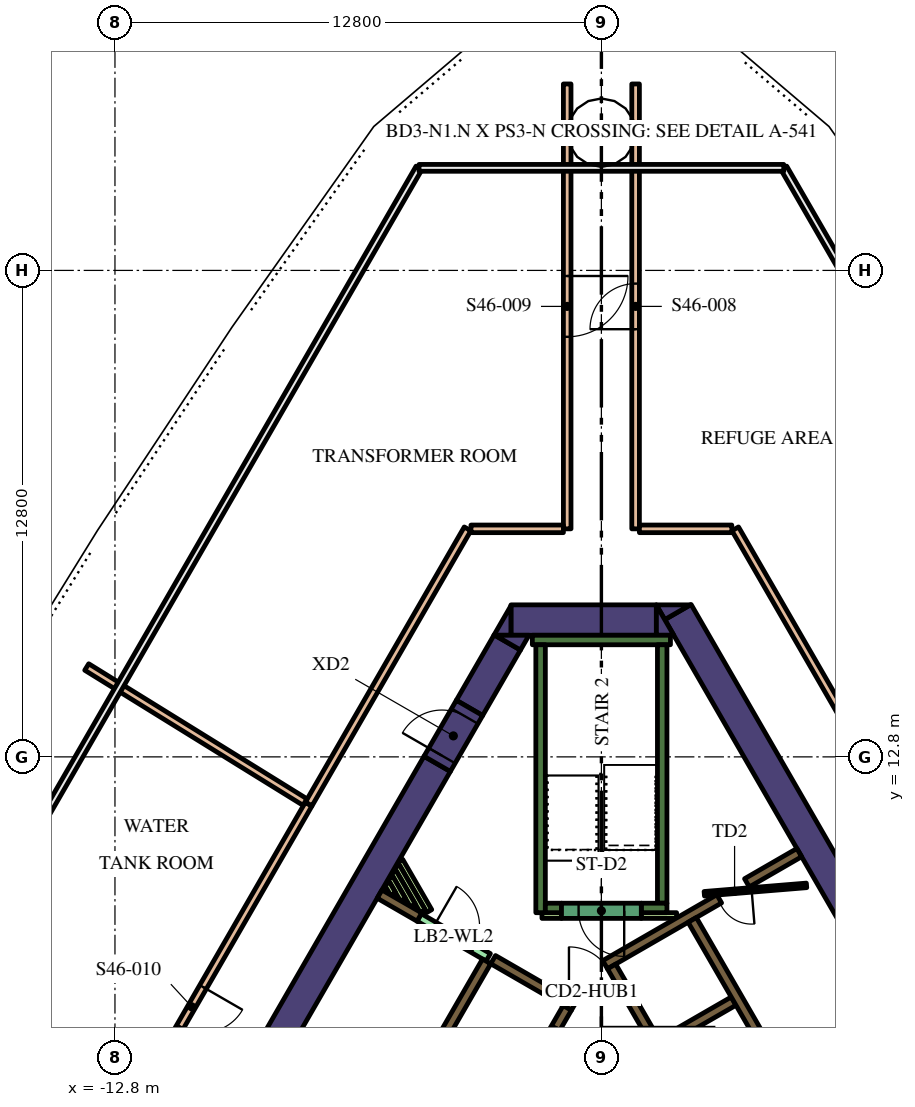
"""IFC4 building model, lengths in metres.
Left out: names, types, materials, properties, quantities, classifications, styles, units other than length and angle.
Written with IfcOpenShell. Run it as: python <this file> out.ifc"""

import sys

from ifc_helpers import new_model, si_unit, direction, frame, frame_2d, origin, place, context, subcontext, project, spatial, polyline, rectangle, outline, extrude, element, fill, save


model = new_model("IFC4")
c1 = context("Model", 3, precision=1e-05, world=origin(), true_north=direction((0.0, 1.0)))
c2 = subcontext(c1, "Body", "Model", "MODEL_VIEW")
j1 = project(units=[si_unit("LENGTHUNIT", "METRE"), si_unit("PLANEANGLEUNIT", "RADIAN")], contexts=[c1])
p1 = place(None, origin())
s1 = spatial("IfcSite", under=j1, at=p1, CompositionType="ELEMENT")
p2 = place(p1, origin())
s2 = spatial("IfcBuilding", under=s1, at=p2, CompositionType="ELEMENT")
p3 = place(p2, frame((0.0, 0.0, 196.2)))
s3 = spatial("IfcBuildingStorey", under=s2, at=p3, CompositionType="ELEMENT", Elevation=196.2)
p4 = place(p3, frame((8.279, 5.761, 0.0), z_axis=(0.0, 0.0, 1.0), x_axis=(-0.500010359015, 0.866019422922, 0.0)))
e1 = element("IfcWall", 1, at=p4, inside=s3, PredefinedType="SOLIDWALL", context=c2, shape_type="SweptSolid", body=[
    extrude(rectangle(XDim=12.528, YDim=0.8, at=frame_2d((6.264, 0.0))), origin(), (0.0, 0.0, 1.0), 5.4),
])
p5 = place(p3, origin())
e2 = element("IfcWall", 2, at=p5, inside=s3, PredefinedType="SOLIDWALL", context=c2, shape_type="SweptSolid", body=[
    extrude(outline(polyline([(1.443, 16.8), (2.339, 16.8), (1.667, 16.412), (1.443, 16.8)])), origin(), (0.0, 0.0, 1.0), 5.4),
])
p6 = place(p3, frame((-2.379, 16.4, 0.0), z_axis=(0.0, 0.0, 1.0), x_axis=(1.0, 0.0, 0.0)))
e3 = element("IfcWall", 3, at=p6, inside=s3, PredefinedType="SOLIDWALL", context=c2, shape_type="SweptSolid", body=[
    extrude(rectangle(XDim=3.824, YDim=0.8, at=frame_2d((1.912, 0.0))), origin(), (0.0, 0.0, 1.0), 5.4),
])
e4 = element("IfcWall", 4, at=p5, inside=s3, PredefinedType="SOLIDWALL", context=c2, shape_type="SweptSolid", body=[
    extrude(outline(polyline([(1.905, 16.0), (1.447, 16.0), (1.447, 16.793), (1.905, 16.0)])), origin(), (0.0, 0.0, 1.0), 5.4),
])
e5 = element("IfcWall", 5, at=p5, inside=s3, PredefinedType="SOLIDWALL", context=c2, shape_type="SweptSolid", body=[
    extrude(outline(polyline([(-2.829, 16.0), (-2.381, 16.776), (-2.381, 16.0), (-2.829, 16.0)])), origin(), (0.0, 0.0, 1.0), 5.4),
])
p7 = place(p3, frame((-2.477, 15.81, 0.0), z_axis=(0.0, 0.0, 1.0), x_axis=(-0.499903161488, -0.866081306307, 0.0)))
e6 = element("IfcWall", 6, at=p7, inside=s3, PredefinedType="SOLIDWALL", context=c2, shape_type="SweptSolid", body=[
    extrude(rectangle(XDim=1.988, YDim=0.8, at=frame_2d((0.994, 0.0))), origin(), (0.0, 0.0, 1.0), 5.4),
])
e7 = element("IfcWall", 7, at=p5, inside=s3, PredefinedType="SOLIDWALL", context=c2, shape_type="SweptSolid", body=[
    extrude(outline(polyline([(-1.905, 16.0), (-2.129, 15.612), (-2.801, 16.0), (-1.905, 16.0)])), origin(), (0.0, 0.0, 1.0), 5.4),
])
p8 = place(p3, frame((-4.321, 12.616, 0.0), z_axis=(0.0, 0.0, 1.0), x_axis=(-0.500009809857, -0.866019739987, 0.0)))
e8 = element("IfcWall", 8, at=p8, inside=s3, PredefinedType="SOLIDWALL", context=c2, shape_type="SweptSolid", body=[
    extrude(rectangle(XDim=16.695, YDim=0.8, at=frame_2d((8.347, 0.0))), origin(), (0.0, 0.0, 1.0), 5.4),
])
p9 = place(p3, frame((-1.817, 15.875, 0.0), z_axis=(0.0, 0.0, 1.0), x_axis=(1.0, 0.0, 0.0)))
e9 = element("IfcWall", 9, at=p9, inside=s3, PredefinedType="SOLIDWALL", context=c2, shape_type="SweptSolid", body=[
    extrude(rectangle(XDim=3.634, YDim=0.25, at=frame_2d((1.817, 0.0))), origin(), (0.0, 0.0, 1.0), 5.4),
])
p10 = place(p3, frame((1.6, 8.95, 0.0), z_axis=(0.0, 0.0, 1.0), x_axis=(0.0, 1.0, 0.0)))
e10 = element("IfcWall", 10, at=p10, inside=s3, PredefinedType="SOLIDWALL", context=c2, shape_type="SweptSolid", body=[
    extrude(rectangle(XDim=6.8, YDim=0.25, at=frame_2d((3.4, 0.0))), origin(), (0.0, 0.0, 1.0), 5.4),
])
p11 = place(p3, frame((1.05, 8.825, 0.0), z_axis=(0.0, 0.0, 1.0), x_axis=(1.0, 0.0, 0.0)))
e11 = element("IfcWall", 11, at=p11, inside=s3, PredefinedType="SOLIDWALL", context=c2, shape_type="SweptSolid", body=[
    extrude(rectangle(XDim=0.675, YDim=0.25, at=frame_2d((0.337, 0.0))), origin(), (0.0, 0.0, 1.0), 5.4),
])
p12 = place(p3, frame((-1.6, 8.7, 0.0), z_axis=(0.0, 0.0, 1.0), x_axis=(0.0, 1.0, 0.0)))
e12 = element("IfcWall", 12, at=p12, inside=s3, PredefinedType="SOLIDWALL", context=c2, shape_type="SweptSolid", body=[
    extrude(rectangle(XDim=7.05, YDim=0.25, at=frame_2d((3.525, 0.0))), origin(), (0.0, 0.0, 1.0), 5.4),
])
p13 = place(p3, frame((-1.475, 8.825, 0.0), z_axis=(0.0, 0.0, 1.0), x_axis=(1.0, 0.0, 0.0)))
e13 = element("IfcWall", 13, at=p13, inside=s3, PredefinedType="SOLIDWALL", context=c2, shape_type="SweptSolid", body=[
    extrude(rectangle(XDim=0.425, YDim=0.25, at=frame_2d((0.212, 0.0))), origin(), (0.0, 0.0, 1.0), 5.4),
])
p14 = place(p3, frame((3.1, 9.064, 0.0), z_axis=(0.0, 0.0, 1.0), x_axis=(-0.866033137035, -0.499986605379, 0.0)))
e14 = element("IfcWall", 14, at=p14, inside=s3, PredefinedType="SOLIDWALL", context=c2, shape_type="SweptSolid", body=[
    extrude(rectangle(XDim=3.467, YDim=0.25, at=frame_2d((1.733, 0.0))), origin(), (0.0, 0.0, 1.0), 5.4),
])
p15 = place(p3, frame((0.268, 7.285, 0.0), z_axis=(0.0, 0.0, 1.0), x_axis=(0.500098681536, -0.865968422476, 0.0)))
e15 = element("IfcWall", 15, at=p15, inside=s3, PredefinedType="SOLIDWALL", context=c2, shape_type="SweptSolid", body=[
    extrude(rectangle(XDim=0.636, YDim=0.25, at=frame_2d((0.318, 0.0))), origin(), (0.0, 0.0, 1.0), 5.4),
])
p16 = place(p3, frame((5.97, -2.591, 0.0), z_axis=(0.0, 0.0, 1.0), x_axis=(-0.499994469932, 0.866028596547, 0.0)))
e16 = element("IfcWall", 16, at=p16, inside=s3, PredefinedType="SOLIDWALL", context=c2, shape_type="SweptSolid", body=[
    extrude(rectangle(XDim=10.488, YDim=0.25, at=frame_2d((5.244, 0.0))), origin(), (0.0, 0.0, 1.0), 5.4),
])
p17 = place(p3, frame((1.574, 5.274, 0.0), z_axis=(0.0, 0.0, 1.0), x_axis=(0.866028486751, 0.499994660107, 0.0)))
e17 = element("IfcWall", 17, at=p17, inside=s3, PredefinedType="SOLIDWALL", context=c2, shape_type="SweptSolid", body=[
    extrude(rectangle(XDim=2.2, YDim=0.25, at=frame_2d((1.1, 0.0))), origin(), (0.0, 0.0, 1.0), 5.4),
])
p18 = place(p3, frame((3.83, 9.486, 0.0), z_axis=(0.0, 0.0, 1.0), x_axis=(0.865986202621, 0.500067892261, 0.0)))
e18 = element("IfcWall", 18, at=p18, inside=s3, PredefinedType="SOLIDWALL", context=c2, shape_type="SweptSolid", body=[
    extrude(rectangle(XDim=1.591, YDim=0.25, at=frame_2d((0.795, 0.0))), origin(), (0.0, 0.0, 1.0), 5.4),
])
p19 = place(p3, frame((-3.02, 7.419, 0.0), z_axis=(0.0, 0.0, 1.0), x_axis=(-0.500022956343, -0.866012149528, 0.0)))
e19 = element("IfcWall", 19, at=p19, inside=s3, PredefinedType="SOLIDWALL", context=c2, shape_type="SweptSolid", body=[
    extrude(rectangle(XDim=10.08, YDim=0.25, at=frame_2d((5.04, 0.0))), origin(), (0.0, 0.0, 1.0), 5.4),
])
e20 = element("IfcWall", 20, at=p5, inside=s3, PredefinedType="SOLIDWALL", context=c2, shape_type="SweptSolid", body=[
    extrude(outline(polyline([(-2.912, 7.356), (-2.787, 7.573), (-1.232, 6.675), (-1.303, 6.675), (-1.304, 6.675), (-1.304, 6.675), (-1.304, 6.525), (-1.304, 6.525), (-1.303, 6.525), (-0.971, 6.525), (-0.665, 6.348), (-0.79, 6.132), (-1.007, 6.257), (-1.007, 6.257), (-2.912, 7.356)])), origin(), (0.0, 0.0, 1.0), 5.4),
])
p20 = place(p3, frame((-5.837, 9.19, 0.0), z_axis=(0.0, 0.0, 1.0), x_axis=(0.866024298998, -0.500001913541, 0.0)))
e21 = element("IfcWall", 21, at=p20, inside=s3, PredefinedType="SOLIDWALL", context=c2, shape_type="SweptSolid", body=[
    extrude(rectangle(XDim=1.21, YDim=0.25, at=frame_2d((0.605, 0.0))), origin(), (0.0, 0.0, 1.0), 5.4),
])
p21 = place(p3, frame((-5.294, 10.067, 0.0), z_axis=(0.0, 0.0, 1.0), x_axis=(0.500054140411, -0.865994143547, 0.0)))
e22 = element("IfcWall", 22, at=p21, inside=s3, PredefinedType="PARTITIONING", context=c2, shape_type="SweptSolid", body=[
    extrude(rectangle(XDim=1.529, YDim=0.15, at=frame_2d((0.765, 0.0))), origin(), (0.0, 0.0, 1.0), 4.65),
])
p22 = place(p3, frame((-5.381, 9.917, 0.0), z_axis=(0.0, 0.0, 1.0), x_axis=(0.500136970483, -0.865946309396, 0.0)))
e23 = element("IfcWall", 23, at=p22, inside=s3, PredefinedType="PARTITIONING", context=c2, shape_type="SweptSolid", body=[
    extrude(rectangle(XDim=1.359, YDim=0.15, at=frame_2d((0.68, 0.0))), origin(), (0.0, 0.0, 1.0), 4.65),
])
p23 = place(p3, frame((-5.467, 9.767, 0.0), z_axis=(0.0, 0.0, 1.0), x_axis=(0.500168849293, -0.86592789665, 0.0)))
e24 = element("IfcWall", 24, at=p23, inside=s3, PredefinedType="PARTITIONING", context=c2, shape_type="SweptSolid", body=[
    extrude(rectangle(XDim=1.01, YDim=0.15, at=frame_2d((0.505, 0.0))), origin(), (0.0, 0.0, 1.0), 4.65),
])
p24 = place(p3, frame((-5.554, 9.617, 0.0), z_axis=(0.0, 0.0, 1.0), x_axis=(0.500253084543, -0.86587923604, 0.0)))
e25 = element("IfcWall", 25, at=p24, inside=s3, PredefinedType="PARTITIONING", context=c2, shape_type="SweptSolid", body=[
    extrude(rectangle(XDim=0.664, YDim=0.15, at=frame_2d((0.332, 0.0))), origin(), (0.0, 0.0, 1.0), 4.65),
])
p25 = place(p3, frame((-5.64, 9.467, 0.0), z_axis=(0.0, 0.0, 1.0), x_axis=(0.499944387978, -0.86605750902, 0.0)))
e26 = element("IfcWall", 26, at=p25, inside=s3, PredefinedType="PARTITIONING", context=c2, shape_type="SweptSolid", body=[
    extrude(rectangle(XDim=0.317, YDim=0.15, at=frame_2d((0.159, 0.0))), origin(), (0.0, 0.0, 1.0), 4.65),
])
p26 = place(p3, frame((1.05, 8.625, 0.0), z_axis=(0.0, 0.0, 1.0), x_axis=(1.0, 0.0, 0.0)))
e27 = element("IfcWall", 27, at=p26, inside=s3, PredefinedType="PARTITIONING", context=c2, shape_type="SweptSolid", body=[
    extrude(rectangle(XDim=0.929, YDim=0.15, at=frame_2d((0.464, 0.0))), origin(), (0.0, 0.0, 1.0), 4.65),
])
p27 = place(p3, frame((-1.564, 8.625, 0.0), z_axis=(0.0, 0.0, 1.0), x_axis=(1.0, 0.0, 0.0)))
e28 = element("IfcWall", 28, at=p27, inside=s3, PredefinedType="PARTITIONING", context=c2, shape_type="SweptSolid", body=[
    extrude(rectangle(XDim=0.514, YDim=0.15, at=frame_2d((0.257, 0.0))), origin(), (0.0, 0.0, 1.0), 4.65),
])
p28 = place(p3, frame((8.565, -2.185, 0.0), z_axis=(0.0, 0.0, 1.0), x_axis=(-0.499997954832, 0.866026584559, 0.0)))
e29 = element("IfcWall", 29, at=p28, inside=s3, PredefinedType="SOLIDWALL", context=c2, shape_type="SweptSolid", body=[
    extrude(rectangle(XDim=12.35, YDim=0.25, at=frame_2d((6.175, 0.0))), origin(), (0.0, 0.0, 1.0), 5.4),
])
p29 = place(p28, frame((0.585, 0.0, 0.0)))
e30 = element("IfcOpeningElement", 30, at=p29, cuts=e29, PredefinedType="OPENING", context=c2, shape_type="SweptSolid", body=[
    extrude(rectangle(XDim=1.1, YDim=2.1, at=frame_2d((0.55, 1.05))), frame((0.0, 0.135, 0.0), z_axis=(0.0, -1.0, 0.0), x_axis=(1.0, 0.0, 0.0)), (0.0, 0.0, 1.0), 0.27),
])
p30 = place(p3, frame((-0.898, 6.194, 0.0), z_axis=(0.0, 0.0, 1.0), x_axis=(-0.499996202215, -0.866027596426, 0.0)))
e31 = element("IfcWall", 31, at=p30, inside=s3, PredefinedType="SOLIDWALL", context=c2, shape_type="SweptSolid", body=[
    extrude(rectangle(XDim=9.83, YDim=0.25, at=frame_2d((4.915, 0.0))), origin(), (0.0, 0.0, 1.0), 5.4),
])
p31 = place(p30, frame((0.585, 0.0, 0.0)))
e32 = element("IfcOpeningElement", 32, at=p31, cuts=e31, PredefinedType="OPENING", context=c2, shape_type="SweptSolid", body=[
    extrude(rectangle(XDim=1.1, YDim=2.1, at=frame_2d((0.55, 1.05))), frame((0.0, 0.135, 0.0), z_axis=(0.0, -1.0, 0.0), x_axis=(1.0, 0.0, 0.0)), (0.0, 0.0, 1.0), 0.27),
])
p32 = place(p30, frame((3.105, 0.0, 0.0)))
e33 = element("IfcOpeningElement", 33, at=p32, cuts=e31, PredefinedType="OPENING", context=c2, shape_type="SweptSolid", body=[
    extrude(rectangle(XDim=1.1, YDim=2.1, at=frame_2d((0.55, 1.05))), frame((0.0, 0.135, 0.0), z_axis=(0.0, -1.0, 0.0), x_axis=(1.0, 0.0, 0.0)), (0.0, 0.0, 1.0), 0.27),
])
p33 = place(p30, frame((5.625, 0.0, 0.0)))
e34 = element("IfcOpeningElement", 34, at=p33, cuts=e31, PredefinedType="OPENING", context=c2, shape_type="SweptSolid", body=[
    extrude(rectangle(XDim=1.1, YDim=2.1, at=frame_2d((0.55, 1.05))), frame((0.0, 0.135, 0.0), z_axis=(0.0, -1.0, 0.0), x_axis=(1.0, 0.0, 0.0)), (0.0, 0.0, 1.0), 0.27),
])
p34 = place(p30, frame((8.145, 0.0, 0.0)))
e35 = element("IfcOpeningElement", 35, at=p34, cuts=e31, PredefinedType="OPENING", context=c2, shape_type="SweptSolid", body=[
    extrude(rectangle(XDim=1.1, YDim=2.1, at=frame_2d((0.55, 1.05))), frame((0.0, 0.135, 0.0), z_axis=(0.0, -1.0, 0.0), x_axis=(1.0, 0.0, 0.0)), (0.0, 0.0, 1.0), 0.27),
])
p35 = place(p3, frame((1.05, 8.75, 0.0), z_axis=(0.0, 0.0, 1.0), x_axis=(-1.0, 0.0, 0.0)))
e36 = element("IfcWall", 36, at=p35, inside=s3, PredefinedType="SOLIDWALL", context=c2, shape_type="SweptSolid", body=[
    extrude(rectangle(XDim=2.1, YDim=0.4, at=frame_2d((1.05, 0.0))), origin(), (0.0, 0.0, 1.0), 5.4),
])
p36 = place(p35, frame((0.45, 0.0, 0.0)))
e37 = element("IfcOpeningElement", 37, at=p36, cuts=e36, PredefinedType="OPENING", context=c2, shape_type="SweptSolid", body=[
    extrude(rectangle(XDim=1.2, YDim=2.1, at=frame_2d((0.6, 1.05))), frame((0.0, 0.21, 0.0), z_axis=(0.0, -1.0, 0.0), x_axis=(1.0, 0.0, 0.0)), (0.0, 0.0, 1.0), 0.42),
])
p37 = place(p3, frame((5.398, 9.419, 0.0), z_axis=(0.0, 0.0, 1.0), x_axis=(-0.996653416376, -0.081743303248, 0.0)))
e38 = element("IfcWall", 38, at=p37, inside=s3, PredefinedType="PARTITIONING", context=c2, shape_type="SweptSolid", body=[
    extrude(rectangle(XDim=2.7, YDim=0.12, at=frame_2d((1.35, 0.0))), origin(), (0.0, 0.0, 1.0), 4.65),
])
p38 = place(p37, frame((1.45, 0.0, 0.0)))
e39 = element("IfcOpeningElement", 39, at=p38, cuts=e38, PredefinedType="OPENING", context=c2, shape_type="SweptSolid", body=[
    extrude(rectangle(XDim=0.9, YDim=2.1, at=frame_2d((0.45, 1.05))), frame((0.0, 0.07, 0.0), z_axis=(0.0, -1.0, 0.0), x_axis=(1.0, 0.0, 0.0)), (0.0, 0.0, 1.0), 0.14),
])
p39 = place(p3, frame((-1.303, 6.6, 0.0), z_axis=(0.0, 0.0, 1.0), x_axis=(1.0, 0.0, 0.0)))
e40 = element("IfcWall", 40, at=p39, inside=s3, PredefinedType="PARTITIONING", context=c2, shape_type="SweptSolid", body=[
    extrude(rectangle(XDim=2.1, YDim=0.15, at=frame_2d((1.05, 0.0))), origin(), (0.0, 0.0, 1.0), 5.4),
])
p40 = place(p39, frame((0.45, 0.0, 0.0)))
e41 = element("IfcOpeningElement", 41, at=p40, cuts=e40, PredefinedType="OPENING", context=c2, shape_type="SweptSolid", body=[
    extrude(rectangle(XDim=1.2, YDim=2.1, at=frame_2d((0.6, 1.05))), frame((0.0, 0.085, 0.0), z_axis=(0.0, -1.0, 0.0), x_axis=(1.0, 0.0, 0.0)), (0.0, 0.0, 1.0), 0.17),
])
p41 = place(p3, frame((-4.796, 8.575, 0.0), z_axis=(0.0, 0.0, 1.0), x_axis=(0.866009402589, -0.500027713859, 0.0)))
e42 = element("IfcWall", 42, at=p41, inside=s3, PredefinedType="PARTITIONING", context=c2, shape_type="SweptSolid", body=[
    extrude(rectangle(XDim=2.1, YDim=0.226, at=frame_2d((1.05, 0.0))), origin(), (0.0, 0.0, 1.0), 4.65),
])
p42 = place(p41, frame((0.45, 0.0, 0.0)))
e43 = element("IfcOpeningElement", 43, at=p42, cuts=e42, PredefinedType="OPENING", context=c2, shape_type="SweptSolid", body=[
    extrude(rectangle(XDim=1.2, YDim=2.1, at=frame_2d((0.6, 1.05))), frame((0.0, 0.123, 0.0), z_axis=(0.0, -1.0, 0.0), x_axis=(1.0, 0.0, 0.0)), (0.0, 0.0, 1.0), 0.246),
])
p43 = place(p3, frame((-4.321, 12.616, 0.0), z_axis=(0.0, 0.0, 1.0), x_axis=(0.499892348375, 0.866087547558, 0.0)))
e44 = element("IfcWall", 44, at=p43, inside=s3, PredefinedType="SOLIDWALL", context=c2, shape_type="SweptSolid", body=[
    extrude(rectangle(XDim=1.7, YDim=0.8, at=frame_2d((0.85, 0.0))), origin(), (0.0, 0.0, 1.0), 5.4),
])
p44 = place(p43, frame((0.25, 0.0, 0.0)))
e45 = element("IfcOpeningElement", 45, at=p44, cuts=e44, PredefinedType="OPENING", context=c2, shape_type="SweptSolid", body=[
    extrude(rectangle(XDim=1.2, YDim=2.1, at=frame_2d((0.6, 1.05))), frame((0.0, 0.41, 0.0), z_axis=(0.0, -1.0, 0.0), x_axis=(1.0, 0.0, 0.0)), (0.0, 0.0, 1.0), 0.82),
])
p45 = place(p3, frame((-7.706, 11.553, 0.0), z_axis=(0.0, 0.0, 1.0), x_axis=(-0.500005845305, -0.86602202897, 0.0)))
e46 = element("IfcWall", 46, at=p45, inside=s3, PredefinedType="PARTITIONING", context=c2, shape_type="SweptSolid", body=[
    extrude(rectangle(XDim=12.304, YDim=0.2, at=frame_2d((6.152, 0.0))), origin(), (0.0, 0.0, 1.0), 4.65),
])
p46 = place(p45, frame((5.552, 0.0, 0.0)))
e47 = element("IfcOpeningElement", 47, at=p46, cuts=e46, PredefinedType="OPENING", context=c2, shape_type="SweptSolid", body=[
    extrude(rectangle(XDim=1.2, YDim=2.1, at=frame_2d((0.6, 1.05))), frame((0.0, 0.11, 0.0), z_axis=(0.0, -1.0, 0.0), x_axis=(1.0, 0.0, 0.0)), (0.0, 0.0, 1.0), 0.22),
])
p47 = place(p3, frame((0.9, 18.8, 0.0), z_axis=(0.0, 0.0, 1.0), x_axis=(0.0, 1.0, 0.0)))
e48 = element("IfcWall", 48, at=p47, inside=s3, PredefinedType="PARTITIONING", context=c2, shape_type="SweptSolid", body=[
    extrude(rectangle(XDim=11.706, YDim=0.2, at=frame_2d((5.853, 0.0))), origin(), (0.0, 0.0, 1.0), 4.65),
])
p48 = place(p47, frame((5.253, 0.0, 0.0)))
e49 = element("IfcOpeningElement", 49, at=p48, cuts=e48, PredefinedType="OPENING", context=c2, shape_type="SweptSolid", body=[
    extrude(rectangle(XDim=1.2, YDim=2.1, at=frame_2d((0.6, 1.05))), frame((0.0, 0.11, 0.0), z_axis=(0.0, -1.0, 0.0), x_axis=(1.0, 0.0, 0.0)), (0.0, 0.0, 1.0), 0.22),
])
p49 = place(p3, frame((-0.9, 30.506, 0.0), z_axis=(0.0, 0.0, 1.0), x_axis=(0.0, -1.0, 0.0)))
e50 = element("IfcWall", 50, at=p49, inside=s3, PredefinedType="PARTITIONING", context=c2, shape_type="SweptSolid", body=[
    extrude(rectangle(XDim=11.706, YDim=0.2, at=frame_2d((5.853, 0.0))), origin(), (0.0, 0.0, 1.0), 4.65),
])
p50 = place(p49, frame((5.053, 0.0, 0.0)))
e51 = element("IfcOpeningElement", 51, at=p50, cuts=e50, PredefinedType="OPENING", context=c2, shape_type="SweptSolid", body=[
    extrude(rectangle(XDim=1.6, YDim=2.1, at=frame_2d((0.8, 1.05))), frame((0.0, 0.11, 0.0), z_axis=(0.0, -1.0, 0.0), x_axis=(1.0, 0.0, 0.0)), (0.0, 0.0, 1.0), 0.22),
])
for number, where, z_axis, x_axis in (
    (52, (-7.701, 11.561, 0.0), (0.0, 0.0, 1.0), (0.5, 0.866, 0.0)),
    (53, (3.522, 18.8, 0.0), (0.0, 0.0, 1.0), (0.5, -0.866, 0.0)),
):
    element("IfcWall", number, at=place(p3, frame(where, z_axis=z_axis, x_axis=x_axis)), inside=s3, PredefinedType="PARTITIONING", context=c2, shape_type="SweptSolid", body=[
        extrude(rectangle(XDim=8.359, YDim=0.2, at=frame_2d((4.179, 0.0))), origin(), (0.0, 0.0, 1.0), 4.65),
    ])
p51 = place(p3, frame((-7.8, 11.611, 0.0), z_axis=(0.0, 0.0, 1.0), x_axis=(-0.850373744728, 0.526179146562, 0.0)))
e54 = element("IfcWall", 54, at=p51, inside=s3, PredefinedType="PARTITIONING", context=c2, shape_type="SweptSolid", body=[
    extrude(rectangle(XDim=6.754, YDim=0.2, at=frame_2d((3.377, 0.0))), origin(), (0.0, 0.0, 1.0), 4.65),
])
for number, where, z_axis, x_axis in (
    (55, (-3.432, 18.8, 0.0), (0.0, 0.0, 1.0), (1.0, 0.0, 0.0)),
    (56, (1.0, 18.8, 0.0), (0.0, 0.0, 1.0), (1.0, 0.0, 0.0)),
):
    element("IfcWall", number, at=place(p3, frame(where, z_axis=z_axis, x_axis=x_axis)), inside=s3, PredefinedType="PARTITIONING", context=c2, shape_type="SweptSolid", body=[
        extrude(rectangle(XDim=2.432, YDim=0.2, at=frame_2d((1.216, 0.0))), origin(), (0.0, 0.0, 1.0), 4.65),
    ])
p52 = place(p31, origin())
e57 = element("IfcDoor", 57, at=p52, inside=s3, OperationType="DOUBLE_DOOR_SLIDING", PredefinedType="DOOR", context=c2, shape_type="SweptSolid", body=[
    extrude(rectangle(XDim=1.1, YDim=2.1, at=frame_2d((0.55, 1.05))), frame((0.0, 0.025, 0.0), z_axis=(0.0, -1.0, 0.0), x_axis=(1.0, 0.0, 0.0)), (0.0, 0.0, 1.0), 0.05),
])
fill(e32, e57)
p53 = place(p36, origin())
e58 = element("IfcDoor", 58, at=p53, inside=s3, OperationType="SINGLE_SWING_LEFT", PredefinedType="DOOR", context=c2, shape_type="SweptSolid", body=[
    extrude(rectangle(XDim=1.2, YDim=2.1, at=frame_2d((0.6, 1.05))), frame((0.0, 0.025, 0.0), z_axis=(0.0, -1.0, 0.0), x_axis=(1.0, 0.0, 0.0)), (0.0, 0.0, 1.0), 0.05),
])
fill(e37, e58)
p54 = place(p38, origin())
e59 = element("IfcDoor", 59, at=p54, inside=s3, OperationType="SINGLE_SWING_LEFT", PredefinedType="DOOR", context=c2, shape_type="SweptSolid", body=[
    extrude(rectangle(XDim=0.9, YDim=2.1, at=frame_2d((0.45, 1.05))), frame((0.0, 0.025, 0.0), z_axis=(0.0, -1.0, 0.0), x_axis=(1.0, 0.0, 0.0)), (0.0, 0.0, 1.0), 0.05),
])
fill(e39, e59)
p55 = place(p40, origin())
e60 = element("IfcDoor", 60, at=p55, inside=s3, OperationType="SINGLE_SWING_LEFT", PredefinedType="DOOR", context=c2, shape_type="SweptSolid", body=[
    extrude(rectangle(XDim=1.2, YDim=2.1, at=frame_2d((0.6, 1.05))), frame((0.0, 0.025, 0.0), z_axis=(0.0, -1.0, 0.0), x_axis=(1.0, 0.0, 0.0)), (0.0, 0.0, 1.0), 0.05),
])
fill(e41, e60)
p56 = place(p42, origin())
e61 = element("IfcDoor", 61, at=p56, inside=s3, OperationType="SINGLE_SWING_LEFT", PredefinedType="DOOR", context=c2, shape_type="SweptSolid", body=[
    extrude(rectangle(XDim=1.2, YDim=2.1, at=frame_2d((0.6, 1.05))), frame((0.0, 0.025, 0.0), z_axis=(0.0, -1.0, 0.0), x_axis=(1.0, 0.0, 0.0)), (0.0, 0.0, 1.0), 0.05),
])
fill(e43, e61)
p57 = place(p44, origin())
e62 = element("IfcDoor", 62, at=p57, inside=s3, OperationType="SINGLE_SWING_LEFT", PredefinedType="DOOR", context=c2, shape_type="SweptSolid", body=[
    extrude(rectangle(XDim=1.2, YDim=2.1, at=frame_2d((0.6, 1.05))), frame((0.0, 0.025, 0.0), z_axis=(0.0, -1.0, 0.0), x_axis=(1.0, 0.0, 0.0)), (0.0, 0.0, 1.0), 0.05),
])
fill(e45, e62)
p58 = place(p48, origin())
e63 = element("IfcDoor", 63, at=p58, inside=s3, OperationType="SINGLE_SWING_RIGHT", PredefinedType="DOOR", context=c2, shape_type="SweptSolid", body=[
    extrude(rectangle(XDim=1.2, YDim=2.1, at=frame_2d((0.6, 1.05))), frame((0.0, 0.025, 0.0), z_axis=(0.0, -1.0, 0.0), x_axis=(1.0, 0.0, 0.0)), (0.0, 0.0, 1.0), 0.05),
])
fill(e49, e63)
p59 = place(p50, origin())
e64 = element("IfcDoor", 64, at=p59, inside=s3, OperationType="DOUBLE_DOOR_SINGLE_SWING", PredefinedType="DOOR", context=c2, shape_type="SweptSolid", body=[
    extrude(rectangle(XDim=1.6, YDim=2.1, at=frame_2d((0.8, 1.05))), frame((0.0, 0.025, 0.0), z_axis=(0.0, -1.0, 0.0), x_axis=(1.0, 0.0, 0.0)), (0.0, 0.0, 1.0), 0.05),
])
fill(e51, e64)
p60 = place(p46, origin())
e65 = element("IfcDoor", 65, at=p60, inside=s3, OperationType="SINGLE_SWING_RIGHT", PredefinedType="DOOR", context=c2, shape_type="SweptSolid", body=[
    extrude(rectangle(XDim=1.2, YDim=2.1, at=frame_2d((0.6, 1.05))), frame((0.0, 0.025, 0.0), z_axis=(0.0, -1.0, 0.0), x_axis=(1.0, 0.0, 0.0)), (0.0, 0.0, 1.0), 0.05),
])
fill(e47, e65)
save(model, sys.argv[1])
